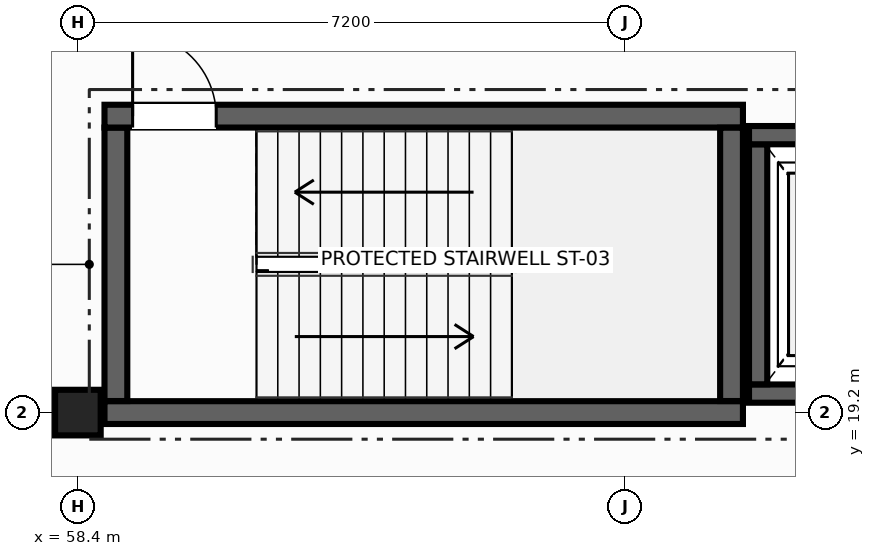
"""IFC4 building model, lengths in metres.
Left out: names, types, materials, properties, quantities, classifications, styles, units other than length and angle.
Written with IfcOpenShell. Run it as: python <this file> out.ifc"""

import sys

from ifc_helpers import new_model, si_unit, direction, frame, frame_2d, origin, origin_2d, place, context, subcontext, project, spatial, rectangle, extrude, element, fill, save


model = new_model("IFC4")
c1 = context("Model", 3, precision=1e-05, world=origin(), true_north=direction((0.0, 1.0)))
c2 = subcontext(c1, "Body", "Model", "MODEL_VIEW")
j1 = project(units=[si_unit("LENGTHUNIT", "METRE"), si_unit("PLANEANGLEUNIT", "RADIAN")], contexts=[c1])
p1 = place(None, origin())
s1 = spatial("IfcSite", under=j1, at=p1, CompositionType="ELEMENT")
p2 = place(p1, origin())
s2 = spatial("IfcBuilding", under=s1, at=p2, CompositionType="ELEMENT")
p3 = place(p2, frame((0.0, 0.0, 9.9)))
s3 = spatial("IfcBuildingStorey", under=s2, at=p3, CompositionType="ELEMENT", Elevation=9.9)
p4 = place(p3, frame((58.4, 19.2, 0.0), z_axis=(0.0, 0.0, 1.0), x_axis=(0.0, 1.0, 0.0)))
e1 = element("IfcColumn", 1, at=p4, inside=s3, PredefinedType="COLUMN", context=c2, shape_type="SweptSolid", body=[
    extrude(rectangle(XDim=0.6, YDim=0.6, at=origin_2d()), origin(), (0.0, 0.0, 1.0), 4.5),
])
p5 = place(p3, frame((67.15, 19.2, 0.0), z_axis=(0.0, 0.0, 1.0), x_axis=(-1.0, 0.0, 0.0)))
e2 = element("IfcWall", 2, at=p5, inside=s3, PredefinedType="SHEAR", context=c2, shape_type="SweptSolid", body=[
    extrude(rectangle(XDim=8.4, YDim=0.3, at=frame_2d((4.2, 0.0))), origin(), (0.0, 0.0, 1.0), 4.22),
])
p6 = place(p3, frame((58.9, 19.352, 0.0), z_axis=(0.0, 0.0, 1.0), x_axis=(0.0, 1.0, 0.0)))
e3 = element("IfcWall", 3, at=p6, inside=s3, PredefinedType="SHEAR", context=c2, shape_type="SweptSolid", body=[
    extrude(rectangle(XDim=3.598, YDim=0.3, at=frame_2d((1.799, 0.0))), origin(), (0.0, 0.0, 1.0), 4.22),
])
p7 = place(p3, frame((58.75, 23.1, 0.0), z_axis=(0.0, 0.0, 1.0), x_axis=(1.0, 0.0, 0.0)))
e4 = element("IfcWall", 4, at=p7, inside=s3, PredefinedType="SHEAR", context=c2, shape_type="SweptSolid", body=[
    extrude(rectangle(XDim=8.4, YDim=0.3, at=frame_2d((4.2, 0.0))), origin(), (0.0, 0.0, 1.0), 4.22),
])
p8 = place(p7, frame((0.37, 0.0, 0.0)))
e5 = element("IfcOpeningElement", 5, at=p8, cuts=e4, PredefinedType="OPENING", context=c2, shape_type="SweptSolid", body=[
    extrude(rectangle(XDim=1.1, YDim=2.15, at=frame_2d((0.55, 1.075))), frame((0.0, 0.16, 0.0), z_axis=(0.0, -1.0, 0.0), x_axis=(1.0, 0.0, 0.0)), (0.0, 0.0, 1.0), 0.32),
])
p9 = place(p3, frame((67.0, 22.948, 0.0), z_axis=(0.0, 0.0, 1.0), x_axis=(0.0, -1.0, 0.0)))
e6 = element("IfcWall", 6, at=p9, inside=s3, PredefinedType="SHEAR", context=c2, shape_type="SweptSolid", body=[
    extrude(rectangle(XDim=3.596, YDim=0.3, at=frame_2d((1.798, 0.0))), origin(), (0.0, 0.0, 1.0), 4.22),
])
p10 = place(p3, frame((70.07, 19.45, 0.0), z_axis=(0.0, 0.0, 1.0), x_axis=(-1.0, 0.0, 0.0)))
e7 = element("IfcWall", 7, at=p10, inside=s3, PredefinedType="SHEAR", context=c2, shape_type="SweptSolid", body=[
    extrude(rectangle(XDim=2.84, YDim=0.24, at=frame_2d((1.42, 0.0))), origin(), (0.0, 0.0, 1.0), 4.22),
])
p11 = place(p3, frame((67.35, 19.572, 0.0), z_axis=(0.0, 0.0, 1.0), x_axis=(0.0, 1.0, 0.0)))
e8 = element("IfcWall", 8, at=p11, inside=s3, PredefinedType="SHEAR", context=c2, shape_type="SweptSolid", body=[
    extrude(rectangle(XDim=3.158, YDim=0.24, at=frame_2d((1.579, 0.0))), origin(), (0.0, 0.0, 1.0), 4.22),
])
p12 = place(p3, frame((67.23, 22.85, 0.0), z_axis=(0.0, 0.0, 1.0), x_axis=(1.0, 0.0, 0.0)))
e9 = element("IfcWall", 9, at=p12, inside=s3, PredefinedType="SHEAR", context=c2, shape_type="SweptSolid", body=[
    extrude(rectangle(XDim=2.84, YDim=0.24, at=frame_2d((1.42, 0.0))), origin(), (0.0, 0.0, 1.0), 4.22),
])
p13 = place(p12, frame((0.82, 0.0, 0.0)))
e10 = element("IfcOpeningElement", 10, at=p13, cuts=e9, PredefinedType="OPENING", context=c2, shape_type="SweptSolid", body=[
    extrude(rectangle(XDim=1.2, YDim=2.15, at=frame_2d((0.6, 1.075))), frame((0.0, 0.13, 0.0), z_axis=(0.0, -1.0, 0.0), x_axis=(1.0, 0.0, 0.0)), (0.0, 0.0, 1.0), 0.26),
])
p14 = place(p8, origin())
e11 = element("IfcDoor", 11, at=p14, inside=s3, OperationType="SINGLE_SWING_LEFT", PredefinedType="DOOR", context=c2, shape_type="SweptSolid", body=[
    extrude(rectangle(XDim=1.1, YDim=2.15, at=frame_2d((0.55, 1.075))), frame((0.0, 0.025, 0.0), z_axis=(0.0, -1.0, 0.0), x_axis=(1.0, 0.0, 0.0)), (0.0, 0.0, 1.0), 0.05),
])
fill(e5, e11)
save(model, sys.argv[1])
